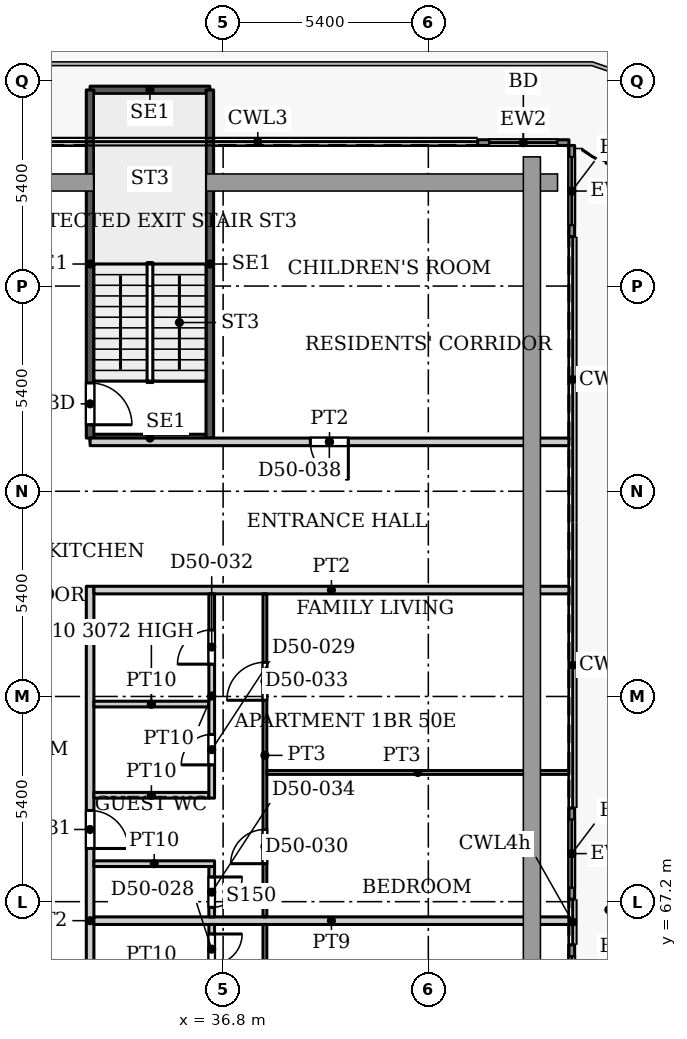
"""IFC4 building model, lengths in metres.
Left out: names, types, materials, properties, quantities, classifications, styles, units other than length and angle.
Written with IfcOpenShell. Run it as: python <this file> out.ifc"""

import sys

from ifc_helpers import new_model, si_unit, direction, frame, frame_2d, origin, place, context, subcontext, project, spatial, rectangle, extrude, source, transform, mapped, element, fill, save


model = new_model("IFC4")
c1 = context("Model", 3, precision=1e-05, world=origin(), true_north=direction((0.0, 1.0)))
c2 = subcontext(c1, "Body", "Model", "MODEL_VIEW")
j1 = project(units=[si_unit("LENGTHUNIT", "METRE"), si_unit("PLANEANGLEUNIT", "RADIAN")], contexts=[c1])
p1 = place(None, origin())
s1 = spatial("IfcSite", under=j1, at=p1, CompositionType="ELEMENT")
p2 = place(p1, origin())
s2 = spatial("IfcBuilding", under=s1, at=p2, CompositionType="ELEMENT")
p3 = place(p2, frame((0.0, 0.0, 216.2)))
s3 = spatial("IfcBuildingStorey", under=s2, at=p3, CompositionType="ELEMENT", Elevation=216.2)
p4 = place(p3, frame((43.5, 87.175, 0.0), z_axis=(0.0, 0.0, 1.0), x_axis=(1.0, 0.0, 0.0)))
e1 = element("IfcWall", 1, at=p4, inside=s3, PredefinedType="SOLIDWALL", context=c2, shape_type="SweptSolid", body=[
    extrude(rectangle(XDim=2.4, YDim=0.15, at=frame_2d((1.2, 0.0))), origin(), (0.0, 0.0, 1.0), 3.75),
])
p5 = place(p4, frame((0.3, 0.0, 0.0)))
e2 = element("IfcOpeningElement", 2, at=p5, cuts=e1, PredefinedType="OPENING", context=c2, shape_type="SweptSolid", body=[
    extrude(rectangle(XDim=1.8, YDim=2.4, at=frame_2d((0.9, 1.2))), frame((0.0, 0.085, 0.0), z_axis=(0.0, -1.0, 0.0), x_axis=(1.0, 0.0, 0.0)), (0.0, 0.0, 1.0), 0.17),
])
p6 = place(p3, frame((45.975, 87.1, 0.0), z_axis=(0.0, 0.0, 1.0), x_axis=(0.0, -1.0, 0.0)))
e3 = element("IfcWall", 3, at=p6, inside=s3, PredefinedType="SOLIDWALL", context=c2, shape_type="SweptSolid", body=[
    extrude(rectangle(XDim=2.4, YDim=0.15, at=frame_2d((1.2, 0.0))), origin(), (0.0, 0.0, 1.0), 3.75),
])
p7 = place(p6, frame((0.3, 0.0, 0.0)))
e4 = element("IfcOpeningElement", 4, at=p7, cuts=e3, PredefinedType="OPENING", context=c2, shape_type="SweptSolid", body=[
    extrude(rectangle(XDim=1.8, YDim=2.4, at=frame_2d((0.9, 1.2))), frame((0.0, 0.085, 0.0), z_axis=(0.0, -1.0, 0.0), x_axis=(1.0, 0.0, 0.0)), (0.0, 0.0, 1.0), 0.17),
])
p8 = place(p3, frame((45.975, 69.665, 0.0), z_axis=(0.0, 0.0, 1.0), x_axis=(0.0, -1.0, 0.0)))
e5 = element("IfcWall", 5, at=p8, inside=s3, PredefinedType="SOLIDWALL", context=c2, shape_type="SweptSolid", body=[
    extrude(rectangle(XDim=2.4, YDim=0.15, at=frame_2d((1.2, 0.0))), origin(), (0.0, 0.0, 1.0), 3.75),
])
p9 = place(p8, frame((0.3, 0.0, 0.0)))
e6 = element("IfcOpeningElement", 6, at=p9, cuts=e5, PredefinedType="OPENING", context=c2, shape_type="SweptSolid", body=[
    extrude(rectangle(XDim=1.8, YDim=2.4, at=frame_2d((0.9, 1.2))), frame((0.0, 0.085, 0.0), z_axis=(0.0, -1.0, 0.0), x_axis=(1.0, 0.0, 0.0)), (0.0, 0.0, 1.0), 0.17),
])
p10 = place(p3, frame((45.975, 66.065, 0.0), z_axis=(0.0, 0.0, 1.0), x_axis=(0.0, -1.0, 0.0)))
e7 = element("IfcWall", 7, at=p10, inside=s3, PredefinedType="SOLIDWALL", context=c2, shape_type="SweptSolid", body=[
    extrude(rectangle(XDim=2.4, YDim=0.15, at=frame_2d((1.2, 0.0))), origin(), (0.0, 0.0, 1.0), 3.75),
])
p11 = place(p10, frame((0.3, 0.0, 0.0)))
e8 = element("IfcOpeningElement", 8, at=p11, cuts=e7, PredefinedType="OPENING", context=c2, shape_type="SweptSolid", body=[
    extrude(rectangle(XDim=1.8, YDim=2.4, at=frame_2d((0.9, 1.2))), frame((0.0, 0.085, 0.0), z_axis=(0.0, -1.0, 0.0), x_axis=(1.0, 0.0, 0.0)), (0.0, 0.0, 1.0), 0.17),
])
for number, where, z_axis, x_axis in (
    (9, (33.3, 79.4, 0.0), (0.0, 0.0, 1.0), (1.0, 0.0, 0.0)),
    (10, (33.3, 88.56, 0.0), (0.0, 0.0, 1.0), (1.0, 0.0, 0.0)),
):
    element("IfcWall", number, at=place(p3, frame(where, z_axis=z_axis, x_axis=x_axis)), inside=s3, PredefinedType="SHEAR", context=c2, shape_type="SweptSolid", body=[
        extrude(rectangle(XDim=3.15, YDim=0.2, at=frame_2d((1.575, 0.0))), origin(), (0.0, 0.0, 1.0), 3.9),
    ])
p12 = place(p3, frame((33.3, 79.4, 0.0), z_axis=(0.0, 0.0, 1.0), x_axis=(0.0, 1.0, 0.0)))
e11 = element("IfcWall", 11, at=p12, inside=s3, PredefinedType="SHEAR", context=c2, shape_type="SweptSolid", body=[
    extrude(rectangle(XDim=9.16, YDim=0.2, at=frame_2d((4.58, 0.0))), origin(), (0.0, 0.0, 1.0), 3.9),
])
p13 = place(p12, frame((0.35, 0.0, 0.0)))
e12 = element("IfcOpeningElement", 12, at=p13, cuts=e11, PredefinedType="OPENING", context=c2, shape_type="SweptSolid", body=[
    extrude(rectangle(XDim=1.1, YDim=2.2, at=frame_2d((0.55, 1.1))), frame((0.0, 0.11, 0.0), z_axis=(0.0, -1.0, 0.0), x_axis=(1.0, 0.0, 0.0)), (0.0, 0.0, 1.0), 0.22),
])
p14 = place(p3, frame((36.45, 79.4, 0.0), z_axis=(0.0, 0.0, 1.0), x_axis=(0.0, 1.0, 0.0)))
e13 = element("IfcWall", 13, at=p14, inside=s3, PredefinedType="SHEAR", context=c2, shape_type="SweptSolid", body=[
    extrude(rectangle(XDim=9.16, YDim=0.2, at=frame_2d((4.58, 0.0))), origin(), (0.0, 0.0, 1.0), 3.9),
])
p15 = place(p3, frame((33.3, 57.9, 0.0), z_axis=(0.0, 0.0, 1.0), x_axis=(0.0, 1.0, 0.0)))
e14 = element("IfcWall", 14, at=p15, inside=s3, PredefinedType="PARTITIONING", context=c2, shape_type="SweptSolid", body=[
    extrude(rectangle(XDim=17.6, YDim=0.2, at=frame_2d((8.8, 0.0))), origin(), (0.0, 0.0, 1.0), 3.6),
])
p16 = place(p15, frame((2.9, 0.0, 0.0)))
e15 = element("IfcOpeningElement", 15, at=p16, cuts=e14, PredefinedType="OPENING", context=c2, shape_type="SweptSolid", body=[
    extrude(rectangle(XDim=1.0, YDim=2.1, at=frame_2d((0.5, 1.05))), frame((0.0, 0.11, 0.0), z_axis=(0.0, -1.0, 0.0), x_axis=(1.0, 0.0, 0.0)), (0.0, 0.0, 1.0), 0.22),
])
p17 = place(p15, frame((10.7, 0.0, 0.0)))
e16 = element("IfcOpeningElement", 16, at=p17, cuts=e14, PredefinedType="OPENING", context=c2, shape_type="SweptSolid", body=[
    extrude(rectangle(XDim=1.0, YDim=2.1, at=frame_2d((0.5, 1.05))), frame((0.0, 0.11, 0.0), z_axis=(0.0, -1.0, 0.0), x_axis=(1.0, 0.0, 0.0)), (0.0, 0.0, 1.0), 0.22),
])
p18 = place(p3, frame((33.3, 79.3, 0.0), z_axis=(0.0, 0.0, 1.0), x_axis=(1.0, 0.0, 0.0)))
e17 = element("IfcWall", 17, at=p18, inside=s3, PredefinedType="PARTITIONING", context=c2, shape_type="SweptSolid", body=[
    extrude(rectangle(XDim=12.6, YDim=0.2, at=frame_2d((6.3, 0.0))), origin(), (0.0, 0.0, 1.0), 3.6),
])
p19 = place(p18, frame((5.795, 0.0, 0.0)))
e18 = element("IfcOpeningElement", 18, at=p19, cuts=e17, PredefinedType="OPENING", context=c2, shape_type="SweptSolid", body=[
    extrude(rectangle(XDim=1.0, YDim=2.1, at=frame_2d((0.5, 1.05))), frame((0.0, 0.11, 0.0), z_axis=(0.0, -1.0, 0.0), x_axis=(1.0, 0.0, 0.0)), (0.0, 0.0, 1.0), 0.22),
])
p20 = place(p3, frame((33.4, 66.7, 0.0), z_axis=(0.0, 0.0, 1.0), x_axis=(1.0, 0.0, 0.0)))
e19 = element("IfcWall", 19, at=p20, inside=s3, PredefinedType="PARTITIONING", context=c2, shape_type="SweptSolid", body=[
    extrude(rectangle(XDim=12.5, YDim=0.2, at=frame_2d((6.25, 0.0))), origin(), (0.0, 0.0, 1.0), 3.6),
])
p21 = place(p3, frame((33.4, 68.2, 0.0), z_axis=(0.0, 0.0, 1.0), x_axis=(1.0, 0.0, 0.0)))
e20 = element("IfcWall", 20, at=p21, inside=s3, PredefinedType="PARTITIONING", context=c2, shape_type="SweptSolid", body=[
    extrude(rectangle(XDim=3.175, YDim=0.15, at=frame_2d((1.587, 0.0))), origin(), (0.0, 0.0, 1.0), 3.6),
])
p22 = place(p3, frame((33.4, 70.0, 0.0), z_axis=(0.0, 0.0, 1.0), x_axis=(1.0, 0.0, 0.0)))
e21 = element("IfcWall", 21, at=p22, inside=s3, PredefinedType="PARTITIONING", context=c2, shape_type="SweptSolid", body=[
    extrude(rectangle(XDim=3.025, YDim=0.15, at=frame_2d((1.513, 0.0))), origin(), (0.0, 0.0, 1.0), 3.6),
])
p23 = place(p3, frame((33.4, 72.4, 0.0), z_axis=(0.0, 0.0, 1.0), x_axis=(1.0, 0.0, 0.0)))
e22 = element("IfcWall", 22, at=p23, inside=s3, PredefinedType="PARTITIONING", context=c2, shape_type="SweptSolid", body=[
    extrude(rectangle(XDim=3.025, YDim=0.15, at=frame_2d((1.513, 0.0))), origin(), (0.0, 0.0, 1.0), 3.072),
])
p24 = place(p3, frame((33.4, 75.4, 0.0), z_axis=(0.0, 0.0, 1.0), x_axis=(1.0, 0.0, 0.0)))
e23 = element("IfcWall", 23, at=p24, inside=s3, PredefinedType="PARTITIONING", context=c2, shape_type="SweptSolid", body=[
    extrude(rectangle(XDim=12.5, YDim=0.2, at=frame_2d((6.25, 0.0))), origin(), (0.0, 0.0, 1.0), 3.6),
])
p25 = place(p3, frame((36.5, 62.15, 0.0), z_axis=(0.0, 0.0, 1.0), x_axis=(0.0, 1.0, 0.0)))
e24 = element("IfcWall", 24, at=p25, inside=s3, PredefinedType="PARTITIONING", context=c2, shape_type="SweptSolid", body=[
    extrude(rectangle(XDim=4.45, YDim=0.15, at=frame_2d((2.225, 0.0))), origin(), (0.0, 0.0, 1.0), 3.6),
])
p26 = place(p25, frame((1.1, 0.0, 0.0)))
e25 = element("IfcOpeningElement", 25, at=p26, cuts=e24, PredefinedType="OPENING", context=c2, shape_type="SweptSolid", body=[
    extrude(rectangle(XDim=0.9, YDim=2.1, at=frame_2d((0.45, 1.05))), frame((0.0, 0.085, 0.0), z_axis=(0.0, -1.0, 0.0), x_axis=(1.0, 0.0, 0.0)), (0.0, 0.0, 1.0), 0.17),
])
p27 = place(p25, frame((3.4, 0.0, 0.0)))
e26 = element("IfcOpeningElement", 26, at=p27, cuts=e24, PredefinedType="OPENING", context=c2, shape_type="SweptSolid", body=[
    extrude(rectangle(XDim=0.8, YDim=2.1, at=frame_2d((0.4, 1.05))), frame((0.0, 0.085, 0.0), z_axis=(0.0, -1.0, 0.0), x_axis=(1.0, 0.0, 0.0)), (0.0, 0.0, 1.0), 0.17),
])
p28 = place(p3, frame((36.5, 66.8, 0.0), z_axis=(0.0, 0.0, 1.0), x_axis=(0.0, 1.0, 0.0)))
e27 = element("IfcWall", 27, at=p28, inside=s3, PredefinedType="PARTITIONING", context=c2, shape_type="SweptSolid", body=[
    extrude(rectangle(XDim=1.325, YDim=0.15, at=frame_2d((0.663, 0.0))), origin(), (0.0, 0.0, 1.0), 3.6),
])
p29 = place(p28, frame((0.25, 0.0, 0.0)))
e28 = element("IfcOpeningElement", 28, at=p29, cuts=e27, PredefinedType="OPENING", context=c2, shape_type="SweptSolid", body=[
    extrude(rectangle(XDim=0.8, YDim=2.1, at=frame_2d((0.4, 1.05))), frame((0.0, 0.085, 0.0), z_axis=(0.0, -1.0, 0.0), x_axis=(1.0, 0.0, 0.0)), (0.0, 0.0, 1.0), 0.17),
])
p30 = place(p3, frame((36.5, 69.925, 0.0), z_axis=(0.0, 0.0, 1.0), x_axis=(0.0, 1.0, 0.0)))
e29 = element("IfcWall", 29, at=p30, inside=s3, PredefinedType="PARTITIONING", context=c2, shape_type="SweptSolid", body=[
    extrude(rectangle(XDim=5.375, YDim=0.15, at=frame_2d((2.688, 0.0))), origin(), (0.0, 0.0, 1.0), 3.6),
])
p31 = place(p30, frame((0.875, 0.0, 0.0)))
e30 = element("IfcOpeningElement", 30, at=p31, cuts=e29, PredefinedType="OPENING", context=c2, shape_type="SweptSolid", body=[
    extrude(rectangle(XDim=0.8, YDim=2.1, at=frame_2d((0.4, 1.05))), frame((0.0, 0.085, 0.0), z_axis=(0.0, -1.0, 0.0), x_axis=(1.0, 0.0, 0.0)), (0.0, 0.0, 1.0), 0.17),
])
p32 = place(p30, frame((3.525, 0.0, 0.0)))
e31 = element("IfcOpeningElement", 31, at=p32, cuts=e29, PredefinedType="OPENING", context=c2, shape_type="SweptSolid", body=[
    extrude(rectangle(XDim=0.9, YDim=2.1, at=frame_2d((0.45, 1.05))), frame((0.0, 0.085, 0.0), z_axis=(0.0, -1.0, 0.0), x_axis=(1.0, 0.0, 0.0)), (0.0, 0.0, 1.0), 0.17),
])
p33 = place(p3, frame((37.9, 58.1, 0.0), z_axis=(0.0, 0.0, 1.0), x_axis=(0.0, 1.0, 0.0)))
e32 = element("IfcWall", 32, at=p33, inside=s3, PredefinedType="PARTITIONING", context=c2, shape_type="SweptSolid", body=[
    extrude(rectangle(XDim=8.5, YDim=0.1, at=frame_2d((4.25, 0.0))), origin(), (0.0, 0.0, 1.0), 3.6),
])
p34 = place(p33, frame((6.2, 0.0, 0.0)))
e33 = element("IfcOpeningElement", 33, at=p34, cuts=e32, PredefinedType="OPENING", context=c2, shape_type="SweptSolid", body=[
    extrude(rectangle(XDim=0.9, YDim=2.1, at=frame_2d((0.45, 1.05))), frame((0.0, 0.06, 0.0), z_axis=(0.0, -1.0, 0.0), x_axis=(1.0, 0.0, 0.0)), (0.0, 0.0, 1.0), 0.12),
])
p35 = place(p33, frame((1.8, 0.0, 0.0)))
e34 = element("IfcOpeningElement", 34, at=p35, cuts=e32, PredefinedType="OPENING", context=c2, shape_type="SweptSolid", body=[
    extrude(rectangle(XDim=1.0, YDim=2.1, at=frame_2d((0.5, 1.05))), frame((0.0, 0.06, 0.0), z_axis=(0.0, -1.0, 0.0), x_axis=(1.0, 0.0, 0.0)), (0.0, 0.0, 1.0), 0.12),
])
p36 = place(p3, frame((37.9, 66.8, 0.0), z_axis=(0.0, 0.0, 1.0), x_axis=(0.0, 1.0, 0.0)))
e35 = element("IfcWall", 35, at=p36, inside=s3, PredefinedType="PARTITIONING", context=c2, shape_type="SweptSolid", body=[
    extrude(rectangle(XDim=8.5, YDim=0.1, at=frame_2d((4.25, 0.0))), origin(), (0.0, 0.0, 1.0), 3.6),
])
p37 = place(p36, frame((1.4, 0.0, 0.0)))
e36 = element("IfcOpeningElement", 36, at=p37, cuts=e35, PredefinedType="OPENING", context=c2, shape_type="SweptSolid", body=[
    extrude(rectangle(XDim=0.9, YDim=2.1, at=frame_2d((0.45, 1.05))), frame((0.0, 0.06, 0.0), z_axis=(0.0, -1.0, 0.0), x_axis=(1.0, 0.0, 0.0)), (0.0, 0.0, 1.0), 0.12),
])
p38 = place(p36, frame((5.7, 0.0, 0.0)))
e37 = element("IfcOpeningElement", 37, at=p38, cuts=e35, PredefinedType="OPENING", context=c2, shape_type="SweptSolid", body=[
    extrude(rectangle(XDim=1.0, YDim=2.1, at=frame_2d((0.5, 1.05))), frame((0.0, 0.06, 0.0), z_axis=(0.0, -1.0, 0.0), x_axis=(1.0, 0.0, 0.0)), (0.0, 0.0, 1.0), 0.12),
])
p39 = place(p3, frame((37.95, 70.6, 0.0), z_axis=(0.0, 0.0, 1.0), x_axis=(1.0, 0.0, 0.0)))
e38 = element("IfcWall", 38, at=p39, inside=s3, PredefinedType="PARTITIONING", context=c2, shape_type="SweptSolid", body=[
    extrude(rectangle(XDim=7.95, YDim=0.1, at=frame_2d((3.975, 0.0))), origin(), (0.0, 0.0, 1.0), 3.6),
])
m1 = source(origin(), c2, "Body", "SweptSolid", [
    extrude(rectangle(XDim=1.8, YDim=2.4, at=frame_2d((0.9, 1.2))), frame((0.0, 0.025, 0.0), z_axis=(0.0, -1.0, 0.0), x_axis=(1.0, 0.0, 0.0)), (0.0, 0.0, 1.0), 0.05),
])
p40 = place(p5, origin())
e39 = element("IfcDoor", 39, at=p40, inside=s3, OperationType="SLIDING_TO_LEFT", PredefinedType="DOOR", context=c2, shape_type="MappedRepresentation", body=[
    mapped(m1, transform((0.0, 0.0, 0.0), x_axis=(1.0, 0.0, 0.0), y_axis=(0.0, 1.0, 0.0), z_axis=(0.0, 0.0, 1.0), scale=1.0)),
])
fill(e2, e39)
p41 = place(p7, origin())
e40 = element("IfcDoor", 40, at=p41, inside=s3, OperationType="SLIDING_TO_LEFT", PredefinedType="DOOR", context=c2, shape_type="MappedRepresentation", body=[
    mapped(m1, transform((0.0, 0.0, 0.0), x_axis=(1.0, 0.0, 0.0), y_axis=(0.0, 1.0, 0.0), z_axis=(0.0, 0.0, 1.0), scale=1.0)),
])
fill(e4, e40)
p42 = place(p9, origin())
e41 = element("IfcDoor", 41, at=p42, inside=s3, OperationType="SLIDING_TO_LEFT", PredefinedType="DOOR", context=c2, shape_type="MappedRepresentation", body=[
    mapped(m1, transform((0.0, 0.0, 0.0), x_axis=(1.0, 0.0, 0.0), y_axis=(0.0, 1.0, 0.0), z_axis=(0.0, 0.0, 1.0), scale=1.0)),
])
fill(e6, e41)
p43 = place(p11, origin())
e42 = element("IfcDoor", 42, at=p43, inside=s3, OperationType="SLIDING_TO_LEFT", PredefinedType="DOOR", context=c2, shape_type="MappedRepresentation", body=[
    mapped(m1, transform((0.0, 0.0, 0.0), x_axis=(1.0, 0.0, 0.0), y_axis=(0.0, 1.0, 0.0), z_axis=(0.0, 0.0, 1.0), scale=1.0)),
])
fill(e8, e42)
m2 = source(origin(), c2, "Body", "SweptSolid", [
    extrude(rectangle(XDim=1.1, YDim=2.2, at=frame_2d((0.55, 1.1))), frame((0.0, 0.025, 0.0), z_axis=(0.0, -1.0, 0.0), x_axis=(1.0, 0.0, 0.0)), (0.0, 0.0, 1.0), 0.05),
])
p44 = place(p13, origin())
e43 = element("IfcDoor", 43, at=p44, inside=s3, OperationType="SINGLE_SWING_RIGHT", PredefinedType="DOOR", context=c2, shape_type="MappedRepresentation", body=[
    mapped(m2, transform((0.0, 0.0, 0.0), x_axis=(1.0, 0.0, 0.0), y_axis=(0.0, 1.0, 0.0), z_axis=(0.0, 0.0, 1.0), scale=1.0)),
])
fill(e12, e43)
m3 = source(origin(), c2, "Body", "SweptSolid", [
    extrude(rectangle(XDim=0.8, YDim=2.1, at=frame_2d((0.4, 1.05))), frame((0.0, 0.025, 0.0), z_axis=(0.0, -1.0, 0.0), x_axis=(1.0, 0.0, 0.0)), (0.0, 0.0, 1.0), 0.05),
])
p45 = place(p27, origin())
e44 = element("IfcDoor", 44, at=p45, inside=s3, OperationType="SINGLE_SWING_RIGHT", PredefinedType="DOOR", context=c2, shape_type="MappedRepresentation", body=[
    mapped(m3, transform((0.0, 0.0, 0.0), x_axis=(1.0, 0.0, 0.0), y_axis=(0.0, 1.0, 0.0), z_axis=(0.0, 0.0, 1.0), scale=1.0)),
])
fill(e26, e44)
p46 = place(p31, origin())
e45 = element("IfcDoor", 45, at=p46, inside=s3, OperationType="SINGLE_SWING_LEFT", PredefinedType="DOOR", context=c2, shape_type="MappedRepresentation", body=[
    mapped(m3, transform((0.0, 0.0, 0.0), x_axis=(1.0, 0.0, 0.0), y_axis=(0.0, 1.0, 0.0), z_axis=(0.0, 0.0, 1.0), scale=1.0)),
])
fill(e30, e45)
m4 = source(origin(), c2, "Body", "SweptSolid", [
    extrude(rectangle(XDim=0.9, YDim=2.1, at=frame_2d((0.45, 1.05))), frame((0.0, 0.025, 0.0), z_axis=(0.0, -1.0, 0.0), x_axis=(1.0, 0.0, 0.0)), (0.0, 0.0, 1.0), 0.05),
])
p47 = place(p37, origin())
e46 = element("IfcDoor", 46, at=p47, inside=s3, OperationType="SINGLE_SWING_LEFT", PredefinedType="DOOR", context=c2, shape_type="MappedRepresentation", body=[
    mapped(m4, transform((0.0, 0.0, 0.0), x_axis=(1.0, 0.0, 0.0), y_axis=(0.0, 1.0, 0.0), z_axis=(0.0, 0.0, 1.0), scale=1.0)),
])
fill(e36, e46)
m5 = source(origin(), c2, "Body", "SweptSolid", [
    extrude(rectangle(XDim=1.0, YDim=2.1, at=frame_2d((0.5, 1.05))), frame((0.0, 0.025, 0.0), z_axis=(0.0, -1.0, 0.0), x_axis=(1.0, 0.0, 0.0)), (0.0, 0.0, 1.0), 0.05),
])
p48 = place(p17, origin())
e47 = element("IfcDoor", 47, at=p48, inside=s3, OperationType="SINGLE_SWING_RIGHT", PredefinedType="DOOR", context=c2, shape_type="MappedRepresentation", body=[
    mapped(m5, transform((0.0, 0.0, 0.0), x_axis=(1.0, 0.0, 0.0), y_axis=(0.0, 1.0, 0.0), z_axis=(0.0, 0.0, 1.0), scale=1.0)),
])
fill(e16, e47)
p49 = place(p32, origin())
e48 = element("IfcDoor", 48, at=p49, inside=s3, OperationType="SINGLE_SWING_LEFT", PredefinedType="DOOR", context=c2, shape_type="MappedRepresentation", body=[
    mapped(m4, transform((0.0, 0.0, 0.0), x_axis=(1.0, 0.0, 0.0), y_axis=(0.0, 1.0, 0.0), z_axis=(0.0, 0.0, 1.0), scale=1.0)),
])
fill(e31, e48)
m6 = source(origin(), c2, "Body", "SweptSolid", [
    extrude(rectangle(XDim=1.0, YDim=2.1, at=frame_2d((0.5, 1.05))), frame((0.0, 0.025, 0.0), z_axis=(0.0, -1.0, 0.0), x_axis=(1.0, 0.0, 0.0)), (0.0, 0.0, 1.0), 0.05),
])
p50 = place(p38, origin())
e49 = element("IfcDoor", 49, at=p50, inside=s3, OperationType="SINGLE_SWING_LEFT", PredefinedType="DOOR", context=c2, shape_type="MappedRepresentation", body=[
    mapped(m6, transform((0.0, 0.0, 0.0), x_axis=(1.0, 0.0, 0.0), y_axis=(0.0, 1.0, 0.0), z_axis=(0.0, 0.0, 1.0), scale=1.0)),
])
fill(e37, e49)
p51 = place(p29, origin())
e50 = element("IfcDoor", 50, at=p51, inside=s3, OperationType="SINGLE_SWING_RIGHT", PredefinedType="DOOR", context=c2, shape_type="MappedRepresentation", body=[
    mapped(m3, transform((0.0, 0.0, 0.0), x_axis=(1.0, 0.0, 0.0), y_axis=(0.0, 1.0, 0.0), z_axis=(0.0, 0.0, 1.0), scale=1.0)),
])
fill(e28, e50)
m7 = source(origin(), c2, "Body", "SweptSolid", [
    extrude(rectangle(XDim=1.0, YDim=2.1, at=frame_2d((0.5, 1.05))), frame((0.0, 0.025, 0.0), z_axis=(0.0, -1.0, 0.0), x_axis=(1.0, 0.0, 0.0)), (0.0, 0.0, 1.0), 0.05),
])
p52 = place(p19, origin())
e51 = element("IfcDoor", 51, at=p52, inside=s3, OperationType="SINGLE_SWING_RIGHT", PredefinedType="DOOR", context=c2, shape_type="MappedRepresentation", body=[
    mapped(m7, transform((0.0, 0.0, 0.0), x_axis=(1.0, 0.0, 0.0), y_axis=(0.0, 1.0, 0.0), z_axis=(0.0, 0.0, 1.0), scale=1.0)),
])
fill(e18, e51)
save(model, sys.argv[1])
